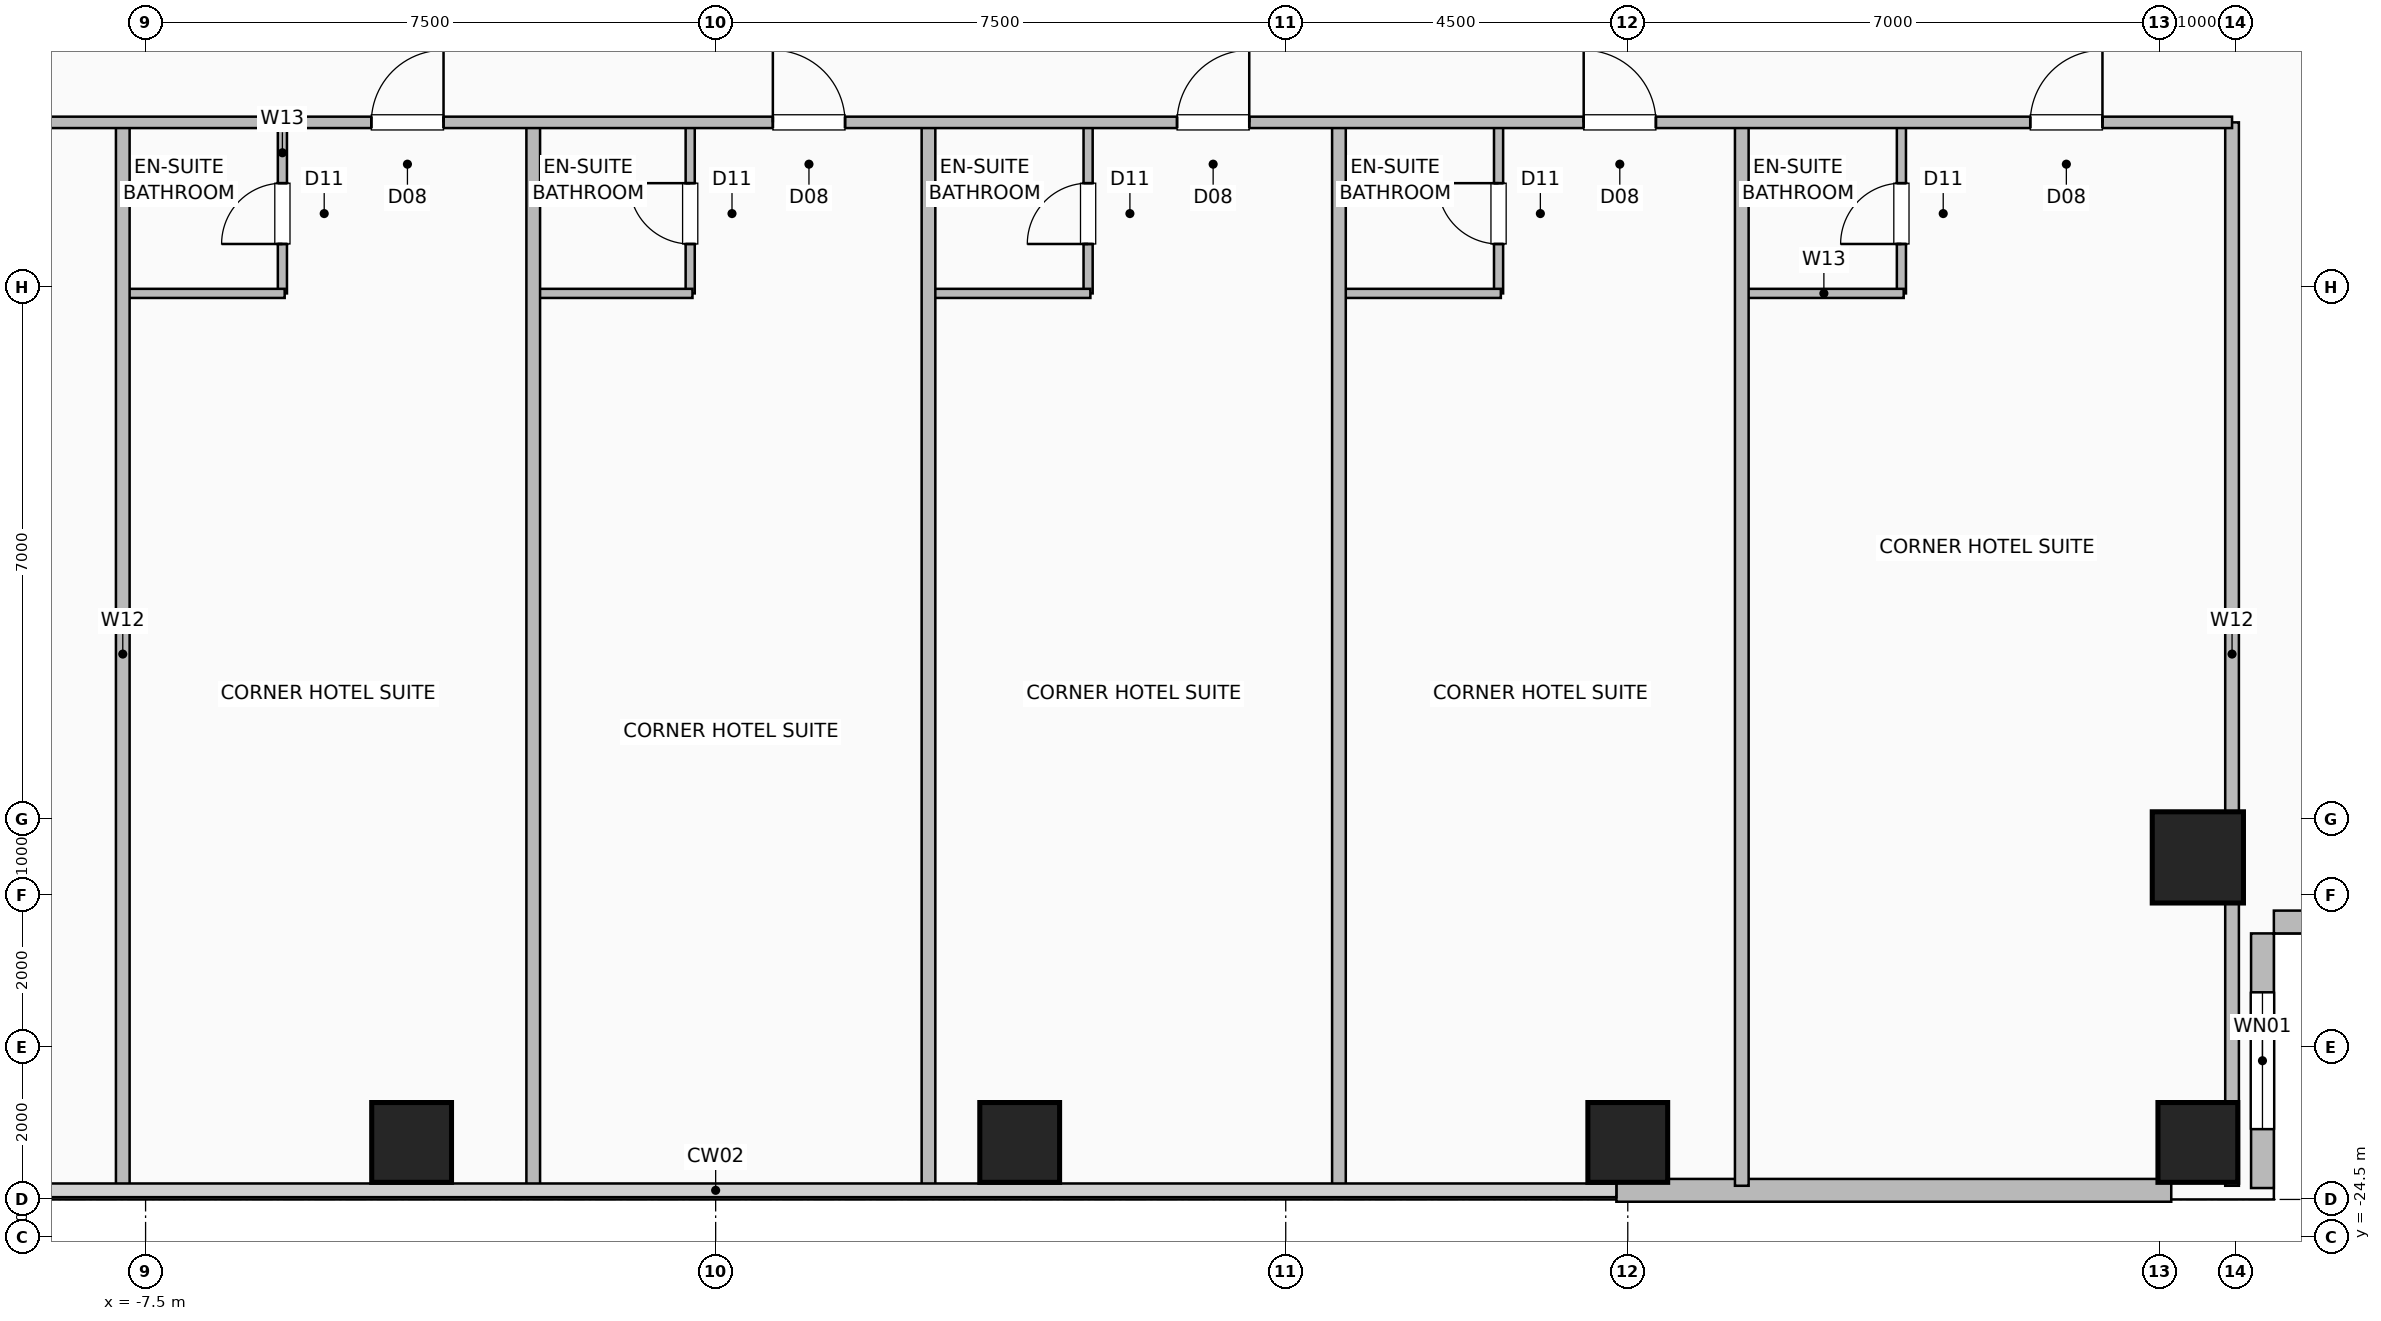
"""IFC4 building model, lengths in metres.
Left out: names, types, materials, properties, quantities, classifications, styles, units other than length and angle.
Written with IfcOpenShell. Run it as: python <this file> out.ifc"""

import sys

from ifc_helpers import new_model, si_unit, direction, frame, frame_2d, origin, origin_2d, place, context, subcontext, project, spatial, rectangle, hollow_rectangle, extrude, element, fill, save


model = new_model("IFC4")
c1 = context("Model", 3, precision=1e-05, world=origin(), true_north=direction((0.0, 1.0)))
c2 = subcontext(c1, "Body", "Model", "MODEL_VIEW")
j1 = project(units=[si_unit("LENGTHUNIT", "METRE"), si_unit("PLANEANGLEUNIT", "RADIAN")], contexts=[c1])
p1 = place(None, origin())
s1 = spatial("IfcSite", under=j1, at=p1, CompositionType="ELEMENT")
p2 = place(p1, origin())
s2 = spatial("IfcBuilding", under=s1, at=p2, CompositionType="ELEMENT")
p3 = place(p2, frame((0.0, 0.0, 76.0)))
s3 = spatial("IfcBuildingStorey", under=s2, at=p3, CompositionType="ELEMENT", Elevation=76.0)
for number, where, z_axis, x_axis in (
    (1, (-4.0, -23.25, 0.0), (0.0, 0.0, 1.0), (1.0, 0.0, 0.0)),
    (2, (4.0, -23.25, 0.0), (0.0, 0.0, 1.0), (1.0, 0.0, 0.0)),
    (3, (12.0, -23.25, 0.0), (0.0, 0.0, 1.0), (1.0, 0.0, 0.0)),
    (4, (19.5, -23.25, 0.0), (0.0, 0.0, 1.0), (1.0, 0.0, 0.0)),
):
    element("IfcColumn", number, at=place(p3, frame(where, z_axis=z_axis, x_axis=x_axis)), inside=s3, PredefinedType="COLUMN", context=c2, shape_type="SweptSolid", body=[
        extrude(hollow_rectangle(XDim=1.05, YDim=1.05, WallThickness=0.05, at=origin_2d()), origin(), (0.0, 0.0, 1.0), 3.5),
    ])
p4 = place(p3, frame((19.5, -19.5, 0.0), z_axis=(0.0, 0.0, 1.0), x_axis=(1.0, 0.0, 0.0)))
e5 = element("IfcColumn", 5, at=p4, inside=s3, PredefinedType="COLUMN", context=c2, shape_type="SweptSolid", body=[
    extrude(hollow_rectangle(XDim=1.2, YDim=1.2, WallThickness=0.055, at=origin_2d()), origin(), (0.0, 0.0, 1.0), 3.5),
])
p5 = place(p3, frame((11.85, -23.88, 0.0), z_axis=(0.0, 0.0, 1.0), x_axis=(1.0, 0.0, 0.0)))
e6 = element("IfcWall", 6, at=p5, inside=s3, PredefinedType="SOLIDWALL", context=c2, shape_type="SweptSolid", body=[
    extrude(rectangle(XDim=7.3, YDim=0.3, at=frame_2d((3.65, 0.0))), origin(), (0.0, 0.0, 1.0), 3.25),
])
p6 = place(p3, frame((20.35, -23.85, 0.0), z_axis=(0.0, 0.0, 1.0), x_axis=(0.0, 1.0, 0.0)))
e7 = element("IfcWall", 7, at=p6, inside=s3, PredefinedType="SOLIDWALL", context=c2, shape_type="SweptSolid", body=[
    extrude(rectangle(XDim=3.35, YDim=0.3, at=frame_2d((1.675, 0.0))), origin(), (0.0, 0.0, 1.0), 3.25),
])
p7 = place(p6, frame((0.775, 0.0, 0.9)))
e8 = element("IfcOpeningElement", 8, at=p7, cuts=e7, PredefinedType="OPENING", context=c2, shape_type="SweptSolid", body=[
    extrude(rectangle(XDim=1.8, YDim=1.8, at=frame_2d((0.9, 0.9))), frame((0.0, 0.16, 0.0), z_axis=(0.0, -1.0, 0.0), x_axis=(1.0, 0.0, 0.0)), (0.0, 0.0, 1.0), 0.32),
])
p8 = place(p3, frame((23.85, -20.35, 0.0), z_axis=(0.0, 0.0, 1.0), x_axis=(-1.0, 0.0, 0.0)))
e9 = element("IfcWall", 9, at=p8, inside=s3, PredefinedType="SOLIDWALL", context=c2, shape_type="SweptSolid", body=[
    extrude(rectangle(XDim=3.35, YDim=0.3, at=frame_2d((1.675, 0.0))), origin(), (0.0, 0.0, 1.0), 3.25),
])
p9 = place(p3, frame((-5.7, -12.08, 0.0), z_axis=(0.0, 0.0, 1.0), x_axis=(0.0, 1.0, 0.0)))
e10 = element("IfcWall", 10, at=p9, inside=s3, PredefinedType="PLUMBINGWALL", context=c2, shape_type="SweptSolid", body=[
    extrude(rectangle(XDim=2.25, YDim=0.12, at=frame_2d((1.125, 0.0))), origin(), (0.0, 0.0, 1.0), 3.25),
])
p10 = place(p9, frame((0.65, 0.0, 0.0)))
e11 = element("IfcOpeningElement", 11, at=p10, cuts=e10, PredefinedType="OPENING", context=c2, shape_type="SweptSolid", body=[
    extrude(rectangle(XDim=0.8, YDim=2.05, at=frame_2d((0.4, 1.025))), frame((0.0, 0.07, 0.0), z_axis=(0.0, -1.0, 0.0), x_axis=(1.0, 0.0, 0.0)), (0.0, 0.0, 1.0), 0.14),
])
p11 = place(p3, frame((-7.77, -12.08, 0.0), z_axis=(0.0, 0.0, 1.0), x_axis=(1.0, 0.0, 0.0)))
e12 = element("IfcWall", 12, at=p11, inside=s3, PredefinedType="PLUMBINGWALL", context=c2, shape_type="SweptSolid", body=[
    extrude(rectangle(XDim=2.1, YDim=0.12, at=frame_2d((1.05, 0.0))), origin(), (0.0, 0.0, 1.0), 3.25),
])
p12 = place(p3, frame((-0.335, -12.08, 0.0), z_axis=(0.0, 0.0, 1.0), x_axis=(0.0, 1.0, 0.0)))
e13 = element("IfcWall", 13, at=p12, inside=s3, PredefinedType="PLUMBINGWALL", context=c2, shape_type="SweptSolid", body=[
    extrude(rectangle(XDim=2.25, YDim=0.12, at=frame_2d((1.125, 0.0))), origin(), (0.0, 0.0, 1.0), 3.25),
])
p13 = place(p12, frame((0.65, 0.0, 0.0)))
e14 = element("IfcOpeningElement", 14, at=p13, cuts=e13, PredefinedType="OPENING", context=c2, shape_type="SweptSolid", body=[
    extrude(rectangle(XDim=0.8, YDim=2.05, at=frame_2d((0.4, 1.025))), frame((0.0, 0.07, 0.0), z_axis=(0.0, -1.0, 0.0), x_axis=(1.0, 0.0, 0.0)), (0.0, 0.0, 1.0), 0.14),
])
p14 = place(p3, frame((-2.37, -12.08, 0.0), z_axis=(0.0, 0.0, 1.0), x_axis=(1.0, 0.0, 0.0)))
e15 = element("IfcWall", 15, at=p14, inside=s3, PredefinedType="PLUMBINGWALL", context=c2, shape_type="SweptSolid", body=[
    extrude(rectangle(XDim=2.065, YDim=0.12, at=frame_2d((1.033, 0.0))), origin(), (0.0, 0.0, 1.0), 3.25),
])
p15 = place(p3, frame((4.9, -12.08, 0.0), z_axis=(0.0, 0.0, 1.0), x_axis=(0.0, 1.0, 0.0)))
e16 = element("IfcWall", 16, at=p15, inside=s3, PredefinedType="PLUMBINGWALL", context=c2, shape_type="SweptSolid", body=[
    extrude(rectangle(XDim=2.25, YDim=0.12, at=frame_2d((1.125, 0.0))), origin(), (0.0, 0.0, 1.0), 3.25),
])
p16 = place(p15, frame((0.65, 0.0, 0.0)))
e17 = element("IfcOpeningElement", 17, at=p16, cuts=e16, PredefinedType="OPENING", context=c2, shape_type="SweptSolid", body=[
    extrude(rectangle(XDim=0.8, YDim=2.05, at=frame_2d((0.4, 1.025))), frame((0.0, 0.07, 0.0), z_axis=(0.0, -1.0, 0.0), x_axis=(1.0, 0.0, 0.0)), (0.0, 0.0, 1.0), 0.14),
])
p17 = place(p3, frame((2.83, -12.08, 0.0), z_axis=(0.0, 0.0, 1.0), x_axis=(1.0, 0.0, 0.0)))
e18 = element("IfcWall", 18, at=p17, inside=s3, PredefinedType="PLUMBINGWALL", context=c2, shape_type="SweptSolid", body=[
    extrude(rectangle(XDim=2.1, YDim=0.12, at=frame_2d((1.05, 0.0))), origin(), (0.0, 0.0, 1.0), 3.25),
])
p18 = place(p3, frame((10.3, -12.08, 0.0), z_axis=(0.0, 0.0, 1.0), x_axis=(0.0, 1.0, 0.0)))
e19 = element("IfcWall", 19, at=p18, inside=s3, PredefinedType="PLUMBINGWALL", context=c2, shape_type="SweptSolid", body=[
    extrude(rectangle(XDim=2.25, YDim=0.12, at=frame_2d((1.125, 0.0))), origin(), (0.0, 0.0, 1.0), 3.25),
])
p19 = place(p18, frame((0.65, 0.0, 0.0)))
e20 = element("IfcOpeningElement", 20, at=p19, cuts=e19, PredefinedType="OPENING", context=c2, shape_type="SweptSolid", body=[
    extrude(rectangle(XDim=0.8, YDim=2.05, at=frame_2d((0.4, 1.025))), frame((0.0, 0.07, 0.0), z_axis=(0.0, -1.0, 0.0), x_axis=(1.0, 0.0, 0.0)), (0.0, 0.0, 1.0), 0.14),
])
p20 = place(p3, frame((8.23, -12.08, 0.0), z_axis=(0.0, 0.0, 1.0), x_axis=(1.0, 0.0, 0.0)))
e21 = element("IfcWall", 21, at=p20, inside=s3, PredefinedType="PLUMBINGWALL", context=c2, shape_type="SweptSolid", body=[
    extrude(rectangle(XDim=2.1, YDim=0.12, at=frame_2d((1.05, 0.0))), origin(), (0.0, 0.0, 1.0), 3.25),
])
p21 = place(p3, frame((15.6, -12.08, 0.0), z_axis=(0.0, 0.0, 1.0), x_axis=(0.0, 1.0, 0.0)))
e22 = element("IfcWall", 22, at=p21, inside=s3, PredefinedType="PLUMBINGWALL", context=c2, shape_type="SweptSolid", body=[
    extrude(rectangle(XDim=2.25, YDim=0.12, at=frame_2d((1.125, 0.0))), origin(), (0.0, 0.0, 1.0), 3.25),
])
p22 = place(p21, frame((0.65, 0.0, 0.0)))
e23 = element("IfcOpeningElement", 23, at=p22, cuts=e22, PredefinedType="OPENING", context=c2, shape_type="SweptSolid", body=[
    extrude(rectangle(XDim=0.8, YDim=2.05, at=frame_2d((0.4, 1.025))), frame((0.0, 0.07, 0.0), z_axis=(0.0, -1.0, 0.0), x_axis=(1.0, 0.0, 0.0)), (0.0, 0.0, 1.0), 0.14),
])
p23 = place(p3, frame((13.53, -12.08, 0.0), z_axis=(0.0, 0.0, 1.0), x_axis=(1.0, 0.0, 0.0)))
e24 = element("IfcWall", 24, at=p23, inside=s3, PredefinedType="PLUMBINGWALL", context=c2, shape_type="SweptSolid", body=[
    extrude(rectangle(XDim=2.1, YDim=0.12, at=frame_2d((1.05, 0.0))), origin(), (0.0, 0.0, 1.0), 3.25),
])
for number, where, z_axis, x_axis in (
    (25, (-7.8, -23.82, 0.0), (0.0, 0.0, 1.0), (0.0, 1.0, 0.0)),
    (26, (-2.4, -23.82, 0.0), (0.0, 0.0, 1.0), (0.0, 1.0, 0.0)),
    (27, (2.8, -23.82, 0.0), (0.0, 0.0, 1.0), (0.0, 1.0, 0.0)),
    (28, (8.2, -23.82, 0.0), (0.0, 0.0, 1.0), (0.0, 1.0, 0.0)),
    (29, (13.5, -23.82, 0.0), (0.0, 0.0, 1.0), (0.0, 1.0, 0.0)),
    (30, (19.95, -23.82, 0.0), (0.0, 0.0, 1.0), (0.0, 1.0, 0.0)),
):
    element("IfcWall", number, at=place(p3, frame(where, z_axis=z_axis, x_axis=x_axis)), inside=s3, PredefinedType="PARTITIONING", context=c2, shape_type="SweptSolid", body=[
        extrude(rectangle(XDim=13.99, YDim=0.18, at=frame_2d((6.995, 0.0))), origin(), (0.0, 0.0, 1.0), 3.25),
    ])
p24 = place(p3, frame((-19.95, -9.83, 0.0), z_axis=(0.0, 0.0, 1.0), x_axis=(1.0, 0.0, 0.0)))
e31 = element("IfcWall", 31, at=p24, inside=s3, PredefinedType="PARTITIONING", context=c2, shape_type="SweptSolid", body=[
    extrude(rectangle(XDim=39.9, YDim=0.15, at=frame_2d((19.95, 0.0))), origin(), (0.0, 0.0, 1.0), 3.25),
])
p25 = place(p24, frame((3.945, 0.0, 0.0)))
e32 = element("IfcOpeningElement", 32, at=p25, cuts=e31, PredefinedType="OPENING", context=c2, shape_type="SweptSolid", body=[
    extrude(rectangle(XDim=0.95, YDim=2.08, at=frame_2d((0.475, 1.04))), frame((0.0, 0.085, 0.0), z_axis=(0.0, -1.0, 0.0), x_axis=(1.0, 0.0, 0.0)), (0.0, 0.0, 1.0), 0.17),
])
p26 = place(p24, frame((10.02, 0.0, 0.0)))
e33 = element("IfcOpeningElement", 33, at=p26, cuts=e31, PredefinedType="OPENING", context=c2, shape_type="SweptSolid", body=[
    extrude(rectangle(XDim=0.95, YDim=2.08, at=frame_2d((0.475, 1.04))), frame((0.0, 0.085, 0.0), z_axis=(0.0, -1.0, 0.0), x_axis=(1.0, 0.0, 0.0)), (0.0, 0.0, 1.0), 0.17),
])
p27 = place(p24, frame((15.42, 0.0, 0.0)))
e34 = element("IfcOpeningElement", 34, at=p27, cuts=e31, PredefinedType="OPENING", context=c2, shape_type="SweptSolid", body=[
    extrude(rectangle(XDim=0.95, YDim=2.08, at=frame_2d((0.475, 1.04))), frame((0.0, 0.085, 0.0), z_axis=(0.0, -1.0, 0.0), x_axis=(1.0, 0.0, 0.0)), (0.0, 0.0, 1.0), 0.17),
])
p28 = place(p24, frame((20.702, 0.0, 0.0)))
e35 = element("IfcOpeningElement", 35, at=p28, cuts=e31, PredefinedType="OPENING", context=c2, shape_type="SweptSolid", body=[
    extrude(rectangle(XDim=0.95, YDim=2.08, at=frame_2d((0.475, 1.04))), frame((0.0, 0.085, 0.0), z_axis=(0.0, -1.0, 0.0), x_axis=(1.0, 0.0, 0.0)), (0.0, 0.0, 1.0), 0.17),
])
p29 = place(p24, frame((26.02, 0.0, 0.0)))
e36 = element("IfcOpeningElement", 36, at=p29, cuts=e31, PredefinedType="OPENING", context=c2, shape_type="SweptSolid", body=[
    extrude(rectangle(XDim=0.95, YDim=2.08, at=frame_2d((0.475, 1.04))), frame((0.0, 0.085, 0.0), z_axis=(0.0, -1.0, 0.0), x_axis=(1.0, 0.0, 0.0)), (0.0, 0.0, 1.0), 0.17),
])
p30 = place(p24, frame((31.37, 0.0, 0.0)))
e37 = element("IfcOpeningElement", 37, at=p30, cuts=e31, PredefinedType="OPENING", context=c2, shape_type="SweptSolid", body=[
    extrude(rectangle(XDim=0.95, YDim=2.08, at=frame_2d((0.475, 1.04))), frame((0.0, 0.085, 0.0), z_axis=(0.0, -1.0, 0.0), x_axis=(1.0, 0.0, 0.0)), (0.0, 0.0, 1.0), 0.17),
])
p31 = place(p24, frame((37.245, 0.0, 0.0)))
e38 = element("IfcOpeningElement", 38, at=p31, cuts=e31, PredefinedType="OPENING", context=c2, shape_type="SweptSolid", body=[
    extrude(rectangle(XDim=0.95, YDim=2.08, at=frame_2d((0.475, 1.04))), frame((0.0, 0.085, 0.0), z_axis=(0.0, -1.0, 0.0), x_axis=(1.0, 0.0, 0.0)), (0.0, 0.0, 1.0), 0.17),
])
p32 = place(p7, origin())
e39 = element("IfcWindow", 39, at=p32, inside=s3, PartitioningType="SINGLE_PANEL", PredefinedType="WINDOW", context=c2, shape_type="SweptSolid", body=[
    extrude(rectangle(XDim=1.8, YDim=1.8, at=frame_2d((0.9, 0.9))), frame((0.0, 0.03, 0.0), z_axis=(0.0, -1.0, 0.0), x_axis=(1.0, 0.0, 0.0)), (0.0, 0.0, 1.0), 0.06),
])
fill(e8, e39)
p33 = place(p10, origin())
e40 = element("IfcDoor", 40, at=p33, inside=s3, OperationType="SINGLE_SWING_LEFT", PredefinedType="DOOR", context=c2, shape_type="SweptSolid", body=[
    extrude(rectangle(XDim=0.8, YDim=2.05, at=frame_2d((0.4, 1.025))), frame((0.0, 0.025, 0.0), z_axis=(0.0, -1.0, 0.0), x_axis=(1.0, 0.0, 0.0)), (0.0, 0.0, 1.0), 0.05),
])
fill(e11, e40)
p34 = place(p13, origin())
e41 = element("IfcDoor", 41, at=p34, inside=s3, OperationType="SINGLE_SWING_RIGHT", PredefinedType="DOOR", context=c2, shape_type="SweptSolid", body=[
    extrude(rectangle(XDim=0.8, YDim=2.05, at=frame_2d((0.4, 1.025))), frame((0.0, 0.025, 0.0), z_axis=(0.0, -1.0, 0.0), x_axis=(1.0, 0.0, 0.0)), (0.0, 0.0, 1.0), 0.05),
])
fill(e14, e41)
p35 = place(p16, origin())
e42 = element("IfcDoor", 42, at=p35, inside=s3, OperationType="SINGLE_SWING_LEFT", PredefinedType="DOOR", context=c2, shape_type="SweptSolid", body=[
    extrude(rectangle(XDim=0.8, YDim=2.05, at=frame_2d((0.4, 1.025))), frame((0.0, 0.025, 0.0), z_axis=(0.0, -1.0, 0.0), x_axis=(1.0, 0.0, 0.0)), (0.0, 0.0, 1.0), 0.05),
])
fill(e17, e42)
p36 = place(p19, origin())
e43 = element("IfcDoor", 43, at=p36, inside=s3, OperationType="SINGLE_SWING_RIGHT", PredefinedType="DOOR", context=c2, shape_type="SweptSolid", body=[
    extrude(rectangle(XDim=0.8, YDim=2.05, at=frame_2d((0.4, 1.025))), frame((0.0, 0.025, 0.0), z_axis=(0.0, -1.0, 0.0), x_axis=(1.0, 0.0, 0.0)), (0.0, 0.0, 1.0), 0.05),
])
fill(e20, e43)
p37 = place(p22, origin())
e44 = element("IfcDoor", 44, at=p37, inside=s3, OperationType="SINGLE_SWING_LEFT", PredefinedType="DOOR", context=c2, shape_type="SweptSolid", body=[
    extrude(rectangle(XDim=0.8, YDim=2.05, at=frame_2d((0.4, 1.025))), frame((0.0, 0.025, 0.0), z_axis=(0.0, -1.0, 0.0), x_axis=(1.0, 0.0, 0.0)), (0.0, 0.0, 1.0), 0.05),
])
fill(e23, e44)
p38 = place(p27, origin())
e45 = element("IfcDoor", 45, at=p38, inside=s3, OperationType="SINGLE_SWING_RIGHT", PredefinedType="DOOR", context=c2, shape_type="SweptSolid", body=[
    extrude(rectangle(XDim=0.95, YDim=2.08, at=frame_2d((0.475, 1.04))), frame((0.0, 0.025, 0.0), z_axis=(0.0, -1.0, 0.0), x_axis=(1.0, 0.0, 0.0)), (0.0, 0.0, 1.0), 0.05),
])
fill(e34, e45)
p39 = place(p28, origin())
e46 = element("IfcDoor", 46, at=p39, inside=s3, OperationType="SINGLE_SWING_LEFT", PredefinedType="DOOR", context=c2, shape_type="SweptSolid", body=[
    extrude(rectangle(XDim=0.95, YDim=2.08, at=frame_2d((0.475, 1.04))), frame((0.0, 0.025, 0.0), z_axis=(0.0, -1.0, 0.0), x_axis=(1.0, 0.0, 0.0)), (0.0, 0.0, 1.0), 0.05),
])
fill(e35, e46)
p40 = place(p29, origin())
e47 = element("IfcDoor", 47, at=p40, inside=s3, OperationType="SINGLE_SWING_RIGHT", PredefinedType="DOOR", context=c2, shape_type="SweptSolid", body=[
    extrude(rectangle(XDim=0.95, YDim=2.08, at=frame_2d((0.475, 1.04))), frame((0.0, 0.025, 0.0), z_axis=(0.0, -1.0, 0.0), x_axis=(1.0, 0.0, 0.0)), (0.0, 0.0, 1.0), 0.05),
])
fill(e36, e47)
p41 = place(p30, origin())
e48 = element("IfcDoor", 48, at=p41, inside=s3, OperationType="SINGLE_SWING_LEFT", PredefinedType="DOOR", context=c2, shape_type="SweptSolid", body=[
    extrude(rectangle(XDim=0.95, YDim=2.08, at=frame_2d((0.475, 1.04))), frame((0.0, 0.025, 0.0), z_axis=(0.0, -1.0, 0.0), x_axis=(1.0, 0.0, 0.0)), (0.0, 0.0, 1.0), 0.05),
])
fill(e37, e48)
p42 = place(p31, origin())
e49 = element("IfcDoor", 49, at=p42, inside=s3, OperationType="SINGLE_SWING_RIGHT", PredefinedType="DOOR", context=c2, shape_type="SweptSolid", body=[
    extrude(rectangle(XDim=0.95, YDim=2.08, at=frame_2d((0.475, 1.04))), frame((0.0, 0.025, 0.0), z_axis=(0.0, -1.0, 0.0), x_axis=(1.0, 0.0, 0.0)), (0.0, 0.0, 1.0), 0.05),
])
fill(e38, e49)
save(model, sys.argv[1])
